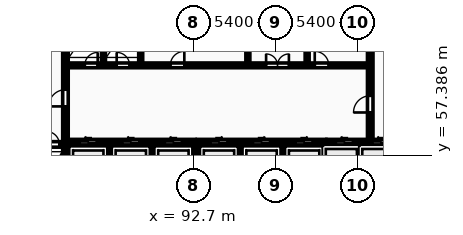
"""IFC4 building model, lengths in metres.
Left out: names, types, materials, properties, quantities, classifications, styles, units other than length and angle.
Written with IfcOpenShell. Run it as: python <this file> out.ifc"""

import sys

from ifc_helpers import new_model, si_unit, direction, frame, frame_2d, origin, place, context, subcontext, project, spatial, rectangle, extrude, element, fill, save


model = new_model("IFC4")
c1 = context("Model", 3, precision=1e-05, world=origin(), true_north=direction((0.0, 1.0)))
c2 = subcontext(c1, "Body", "Model", "MODEL_VIEW")
j1 = project(units=[si_unit("LENGTHUNIT", "METRE"), si_unit("PLANEANGLEUNIT", "RADIAN")], contexts=[c1])
p1 = place(None, origin())
s1 = spatial("IfcSite", under=j1, at=p1, CompositionType="ELEMENT")
p2 = place(p1, origin())
s2 = spatial("IfcBuilding", under=s1, at=p2, CompositionType="ELEMENT")
p3 = place(p2, origin())
s3 = spatial("IfcBuildingStorey", under=s2, at=p3, CompositionType="ELEMENT", Elevation=0.0)
p4 = place(p3, frame((79.79, 58.1, 0.0), z_axis=(0.0, 0.0, 1.0), x_axis=(1.0, 0.0, 0.0)))
e1 = element("IfcWall", 1, at=p4, inside=s3, PredefinedType="SHEAR", context=c2, shape_type="SweptSolid", body=[
    extrude(rectangle(XDim=4.39, YDim=0.25, at=frame_2d((2.195, 0.0))), origin(), (0.0, 0.0, 1.0), 5.4),
])
p5 = place(p4, frame((1.05, 0.0, 0.0)))
e2 = element("IfcOpeningElement", 2, at=p5, cuts=e1, PredefinedType="OPENING", context=c2, shape_type="SweptSolid", body=[
    extrude(rectangle(XDim=1.12, YDim=2.12, at=frame_2d((0.56, 1.06))), frame((0.0, 0.135, 0.0), z_axis=(0.0, -1.0, 0.0), x_axis=(1.0, 0.0, 0.0)), (0.0, 0.0, 1.0), 0.27),
])
p6 = place(p4, frame((3.26, 0.0, 0.0)))
e3 = element("IfcOpeningElement", 3, at=p6, cuts=e1, PredefinedType="OPENING", context=c2, shape_type="SweptSolid", body=[
    extrude(rectangle(XDim=0.85, YDim=2.05, at=frame_2d((0.425, 1.025))), frame((0.0, 0.135, 0.0), z_axis=(0.0, -1.0, 0.0), x_axis=(1.0, 0.0, 0.0)), (0.0, 0.0, 1.0), 0.27),
])
p7 = place(p3, frame((84.3, 55.4, 0.0), z_axis=(0.0, 0.0, 1.0), x_axis=(0.0, 1.0, 0.0)))
e4 = element("IfcWall", 4, at=p7, inside=s3, PredefinedType="SHEAR", context=c2, shape_type="SweptSolid", body=[
    extrude(rectangle(XDim=11.6, YDim=0.25, at=frame_2d((5.8, 0.0))), origin(), (0.0, 0.0, 1.0), 5.4),
])
p8 = place(p7, frame((5.2, 0.0, 0.0)))
e5 = element("IfcOpeningElement", 5, at=p8, cuts=e4, PredefinedType="OPENING", context=c2, shape_type="SweptSolid", body=[
    extrude(rectangle(XDim=1.1, YDim=2.1, at=frame_2d((0.55, 1.05))), frame((0.0, 0.135, 0.0), z_axis=(0.0, -1.0, 0.0), x_axis=(1.0, 0.0, 0.0)), (0.0, 0.0, 1.0), 0.27),
])
for number, where, z_axis, x_axis in (
    (6, (87.2, 55.4, 0.0), (0.0, 0.0, 1.0), (0.0, 1.0, 0.0)),
    (7, (90.0, 55.4, 0.0), (0.0, 0.0, 1.0), (0.0, 1.0, 0.0)),
):
    element("IfcWall", number, at=place(p3, frame(where, z_axis=z_axis, x_axis=x_axis)), inside=s3, PredefinedType="PARTITIONING", context=c2, shape_type="SweptSolid", body=[
        extrude(rectangle(XDim=2.72, YDim=0.2, at=frame_2d((1.36, 0.0))), origin(), (0.0, 0.0, 1.0), 5.1),
    ])
p9 = place(p3, frame((84.42, 58.25, 0.0), z_axis=(0.0, 0.0, 1.0), x_axis=(1.0, 0.0, 0.0)))
e8 = element("IfcWall", 8, at=p9, inside=s3, PredefinedType="SHEAR", context=c2, shape_type="SweptSolid", body=[
    extrude(rectangle(XDim=8.36, YDim=0.25, at=frame_2d((4.18, 0.0))), origin(), (0.0, 0.0, 1.0), 5.4),
])
p10 = place(p9, frame((0.82, 0.0, 0.0)))
e9 = element("IfcOpeningElement", 9, at=p10, cuts=e8, PredefinedType="OPENING", context=c2, shape_type="SweptSolid", body=[
    extrude(rectangle(XDim=1.12, YDim=2.12, at=frame_2d((0.56, 1.06))), frame((0.0, 0.135, 0.0), z_axis=(0.0, -1.0, 0.0), x_axis=(1.0, 0.0, 0.0)), (0.0, 0.0, 1.0), 0.27),
])
p11 = place(p9, frame((3.62, 0.0, 0.0)))
e10 = element("IfcOpeningElement", 10, at=p11, cuts=e8, PredefinedType="OPENING", context=c2, shape_type="SweptSolid", body=[
    extrude(rectangle(XDim=1.12, YDim=2.12, at=frame_2d((0.56, 1.06))), frame((0.0, 0.135, 0.0), z_axis=(0.0, -1.0, 0.0), x_axis=(1.0, 0.0, 0.0)), (0.0, 0.0, 1.0), 0.27),
])
p12 = place(p9, frame((6.42, 0.0, 0.0)))
e11 = element("IfcOpeningElement", 11, at=p12, cuts=e8, PredefinedType="OPENING", context=c2, shape_type="SweptSolid", body=[
    extrude(rectangle(XDim=1.12, YDim=2.12, at=frame_2d((0.56, 1.06))), frame((0.0, 0.135, 0.0), z_axis=(0.0, -1.0, 0.0), x_axis=(1.0, 0.0, 0.0)), (0.0, 0.0, 1.0), 0.27),
])
p13 = place(p3, frame((92.9, 55.4, 0.0), z_axis=(0.0, 0.0, 1.0), x_axis=(0.0, 1.0, 0.0)))
e12 = element("IfcWall", 12, at=p13, inside=s3, PredefinedType="SHEAR", context=c2, shape_type="SweptSolid", body=[
    extrude(rectangle(XDim=2.85, YDim=0.25, at=frame_2d((1.425, 0.0))), origin(), (0.0, 0.0, 1.0), 5.4),
])
for number, where, z_axis, x_axis in (
    (13, (95.8, 55.4, 0.0), (0.0, 0.0, 1.0), (0.0, 1.0, 0.0)),
    (14, (98.6, 55.4, 0.0), (0.0, 0.0, 1.0), (0.0, 1.0, 0.0)),
):
    element("IfcWall", number, at=place(p3, frame(where, z_axis=z_axis, x_axis=x_axis)), inside=s3, PredefinedType="PARTITIONING", context=c2, shape_type="SweptSolid", body=[
        extrude(rectangle(XDim=2.72, YDim=0.2, at=frame_2d((1.36, 0.0))), origin(), (0.0, 0.0, 1.0), 5.1),
    ])
p14 = place(p3, frame((93.02, 58.25, 0.0), z_axis=(0.0, 0.0, 1.0), x_axis=(1.0, 0.0, 0.0)))
e15 = element("IfcWall", 15, at=p14, inside=s3, PredefinedType="SHEAR", context=c2, shape_type="SweptSolid", body=[
    extrude(rectangle(XDim=8.36, YDim=0.25, at=frame_2d((4.18, 0.0))), origin(), (0.0, 0.0, 1.0), 5.4),
])
p15 = place(p14, frame((0.82, 0.0, 0.0)))
e16 = element("IfcOpeningElement", 16, at=p15, cuts=e15, PredefinedType="OPENING", context=c2, shape_type="SweptSolid", body=[
    extrude(rectangle(XDim=1.12, YDim=2.12, at=frame_2d((0.56, 1.06))), frame((0.0, 0.135, 0.0), z_axis=(0.0, -1.0, 0.0), x_axis=(1.0, 0.0, 0.0)), (0.0, 0.0, 1.0), 0.27),
])
p16 = place(p14, frame((3.62, 0.0, 0.0)))
e17 = element("IfcOpeningElement", 17, at=p16, cuts=e15, PredefinedType="OPENING", context=c2, shape_type="SweptSolid", body=[
    extrude(rectangle(XDim=1.12, YDim=2.12, at=frame_2d((0.56, 1.06))), frame((0.0, 0.135, 0.0), z_axis=(0.0, -1.0, 0.0), x_axis=(1.0, 0.0, 0.0)), (0.0, 0.0, 1.0), 0.27),
])
p17 = place(p14, frame((6.42, 0.0, 0.0)))
e18 = element("IfcOpeningElement", 18, at=p17, cuts=e15, PredefinedType="OPENING", context=c2, shape_type="SweptSolid", body=[
    extrude(rectangle(XDim=1.12, YDim=2.12, at=frame_2d((0.56, 1.06))), frame((0.0, 0.135, 0.0), z_axis=(0.0, -1.0, 0.0), x_axis=(1.0, 0.0, 0.0)), (0.0, 0.0, 1.0), 0.27),
])
p18 = place(p3, frame((101.48, 55.4, 0.0), z_axis=(0.0, 0.0, 1.0), x_axis=(0.0, 1.0, 0.0)))
e19 = element("IfcWall", 19, at=p18, inside=s3, PredefinedType="SHEAR", context=c2, shape_type="SweptSolid", body=[
    extrude(rectangle(XDim=2.85, YDim=0.25, at=frame_2d((1.425, 0.0))), origin(), (0.0, 0.0, 1.0), 5.4),
])
p19 = place(p3, frame((103.85, 55.4, 0.0), z_axis=(0.0, 0.0, 1.0), x_axis=(0.0, 1.0, 0.0)))
e20 = element("IfcWall", 20, at=p19, inside=s3, PredefinedType="PARTITIONING", context=c2, shape_type="SweptSolid", body=[
    extrude(rectangle(XDim=2.72, YDim=0.2, at=frame_2d((1.36, 0.0))), origin(), (0.0, 0.0, 1.0), 5.1),
])
p20 = place(p3, frame((101.55, 58.25, 0.0), z_axis=(0.0, 0.0, 1.0), x_axis=(1.0, 0.0, 0.0)))
e21 = element("IfcWall", 21, at=p20, inside=s3, PredefinedType="SHEAR", context=c2, shape_type="SweptSolid", body=[
    extrude(rectangle(XDim=4.6, YDim=0.25, at=frame_2d((2.3, 0.0))), origin(), (0.0, 0.0, 1.0), 5.4),
])
p21 = place(p20, frame((0.54, 0.0, 0.0)))
e22 = element("IfcOpeningElement", 22, at=p21, cuts=e21, PredefinedType="OPENING", context=c2, shape_type="SweptSolid", body=[
    extrude(rectangle(XDim=1.12, YDim=2.12, at=frame_2d((0.56, 1.06))), frame((0.0, 0.135, 0.0), z_axis=(0.0, -1.0, 0.0), x_axis=(1.0, 0.0, 0.0)), (0.0, 0.0, 1.0), 0.27),
])
p22 = place(p20, frame((2.94, 0.0, 0.0)))
e23 = element("IfcOpeningElement", 23, at=p22, cuts=e21, PredefinedType="OPENING", context=c2, shape_type="SweptSolid", body=[
    extrude(rectangle(XDim=1.12, YDim=2.12, at=frame_2d((0.56, 1.06))), frame((0.0, 0.135, 0.0), z_axis=(0.0, -1.0, 0.0), x_axis=(1.0, 0.0, 0.0)), (0.0, 0.0, 1.0), 0.27),
])
for number, where, z_axis, x_axis in (
    (24, (86.8, 63.4, 0.0), (0.0, 0.0, 1.0), (0.0, 1.0, 0.0)),
    (25, (89.25, 63.4, 0.0), (0.0, 0.0, 1.0), (0.0, 1.0, 0.0)),
    (26, (96.3, 63.4, 0.0), (0.0, 0.0, 1.0), (0.0, 1.0, 0.0)),
    (27, (100.2, 63.4, 0.0), (0.0, 0.0, 1.0), (0.0, 1.0, 0.0)),
):
    element("IfcWall", number, at=place(p3, frame(where, z_axis=z_axis, x_axis=x_axis)), inside=s3, PredefinedType="PARTITIONING", context=c2, shape_type="SweptSolid", body=[
        extrude(rectangle(XDim=3.6, YDim=0.15, at=frame_2d((1.8, 0.0))), origin(), (0.0, 0.0, 1.0), 5.1),
    ])
p23 = place(p3, frame((84.42, 63.3, 0.0), z_axis=(0.0, 0.0, 1.0), x_axis=(1.0, 0.0, 0.0)))
e28 = element("IfcWall", 28, at=p23, inside=s3, PredefinedType="PARTITIONING", context=c2, shape_type="SweptSolid", body=[
    extrude(rectangle(XDim=19.83, YDim=0.2, at=frame_2d((9.915, 0.0))), origin(), (0.0, 0.0, 1.0), 5.1),
])
p24 = place(p23, frame((1.15, 0.0, 0.0)))
e29 = element("IfcOpeningElement", 29, at=p24, cuts=e28, PredefinedType="OPENING", context=c2, shape_type="SweptSolid", body=[
    extrude(rectangle(XDim=0.85, YDim=2.05, at=frame_2d((0.425, 1.025))), frame((0.0, 0.11, 0.0), z_axis=(0.0, -1.0, 0.0), x_axis=(1.0, 0.0, 0.0)), (0.0, 0.0, 1.0), 0.22),
])
p25 = place(p23, frame((3.25, 0.0, 0.0)))
e30 = element("IfcOpeningElement", 30, at=p25, cuts=e28, PredefinedType="OPENING", context=c2, shape_type="SweptSolid", body=[
    extrude(rectangle(XDim=0.85, YDim=2.05, at=frame_2d((0.425, 1.025))), frame((0.0, 0.11, 0.0), z_axis=(0.0, -1.0, 0.0), x_axis=(1.0, 0.0, 0.0)), (0.0, 0.0, 1.0), 0.22),
])
p26 = place(p23, frame((13.08, 0.0, 0.0)))
e31 = element("IfcOpeningElement", 31, at=p26, cuts=e28, PredefinedType="OPENING", context=c2, shape_type="SweptSolid", body=[
    extrude(rectangle(XDim=1.5, YDim=2.2, at=frame_2d((0.75, 1.1))), frame((0.0, 0.11, 0.0), z_axis=(0.0, -1.0, 0.0), x_axis=(1.0, 0.0, 0.0)), (0.0, 0.0, 1.0), 0.22),
])
p27 = place(p23, frame((6.78, 0.0, 0.0)))
e32 = element("IfcOpeningElement", 32, at=p27, cuts=e28, PredefinedType="OPENING", context=c2, shape_type="SweptSolid", body=[
    extrude(rectangle(XDim=0.92, YDim=2.08, at=frame_2d((0.46, 1.04))), frame((0.0, 0.11, 0.0), z_axis=(0.0, -1.0, 0.0), x_axis=(1.0, 0.0, 0.0)), (0.0, 0.0, 1.0), 0.22),
])
p28 = place(p23, frame((16.28, 0.0, 0.0)))
e33 = element("IfcOpeningElement", 33, at=p28, cuts=e28, PredefinedType="OPENING", context=c2, shape_type="SweptSolid", body=[
    extrude(rectangle(XDim=0.92, YDim=2.08, at=frame_2d((0.46, 1.04))), frame((0.0, 0.11, 0.0), z_axis=(0.0, -1.0, 0.0), x_axis=(1.0, 0.0, 0.0)), (0.0, 0.0, 1.0), 0.22),
])
p29 = place(p3, frame((104.35, 58.4, 0.0), z_axis=(0.0, 0.0, 1.0), x_axis=(0.0, 1.0, 0.0)))
e34 = element("IfcWall", 34, at=p29, inside=s3, PredefinedType="SHEAR", context=c2, shape_type="SweptSolid", body=[
    extrude(rectangle(XDim=8.6, YDim=0.25, at=frame_2d((4.3, 0.0))), origin(), (0.0, 0.0, 1.0), 5.4),
])
p30 = place(p29, frame((1.8, 0.0, 0.0)))
e35 = element("IfcOpeningElement", 35, at=p30, cuts=e34, PredefinedType="OPENING", context=c2, shape_type="SweptSolid", body=[
    extrude(rectangle(XDim=1.1, YDim=2.1, at=frame_2d((0.55, 1.05))), frame((0.0, 0.135, 0.0), z_axis=(0.0, -1.0, 0.0), x_axis=(1.0, 0.0, 0.0)), (0.0, 0.0, 1.0), 0.27),
])
p31 = place(p6, origin())
e36 = element("IfcDoor", 36, at=p31, inside=s3, OperationType="SINGLE_SWING_LEFT", PredefinedType="DOOR", context=c2, shape_type="SweptSolid", body=[
    extrude(rectangle(XDim=0.85, YDim=2.05, at=frame_2d((0.425, 1.025))), frame((0.0, 0.025, 0.0), z_axis=(0.0, -1.0, 0.0), x_axis=(1.0, 0.0, 0.0)), (0.0, 0.0, 1.0), 0.05),
])
fill(e3, e36)
p32 = place(p8, origin())
e37 = element("IfcDoor", 37, at=p32, inside=s3, OperationType="SINGLE_SWING_LEFT", PredefinedType="DOOR", context=c2, shape_type="SweptSolid", body=[
    extrude(rectangle(XDim=1.1, YDim=2.1, at=frame_2d((0.55, 1.05))), frame((0.0, 0.025, 0.0), z_axis=(0.0, -1.0, 0.0), x_axis=(1.0, 0.0, 0.0)), (0.0, 0.0, 1.0), 0.05),
])
fill(e5, e37)
p33 = place(p10, origin())
e38 = element("IfcDoor", 38, at=p33, inside=s3, OperationType="SLIDING_TO_LEFT", PredefinedType="DOOR", context=c2, shape_type="SweptSolid", body=[
    extrude(rectangle(XDim=1.12, YDim=2.12, at=frame_2d((0.56, 1.06))), frame((0.0, 0.025, 0.0), z_axis=(0.0, -1.0, 0.0), x_axis=(1.0, 0.0, 0.0)), (0.0, 0.0, 1.0), 0.05),
])
fill(e9, e38)
p34 = place(p11, origin())
e39 = element("IfcDoor", 39, at=p34, inside=s3, OperationType="SLIDING_TO_LEFT", PredefinedType="DOOR", context=c2, shape_type="SweptSolid", body=[
    extrude(rectangle(XDim=1.12, YDim=2.12, at=frame_2d((0.56, 1.06))), frame((0.0, 0.025, 0.0), z_axis=(0.0, -1.0, 0.0), x_axis=(1.0, 0.0, 0.0)), (0.0, 0.0, 1.0), 0.05),
])
fill(e10, e39)
p35 = place(p12, origin())
e40 = element("IfcDoor", 40, at=p35, inside=s3, OperationType="SLIDING_TO_LEFT", PredefinedType="DOOR", context=c2, shape_type="SweptSolid", body=[
    extrude(rectangle(XDim=1.12, YDim=2.12, at=frame_2d((0.56, 1.06))), frame((0.0, 0.025, 0.0), z_axis=(0.0, -1.0, 0.0), x_axis=(1.0, 0.0, 0.0)), (0.0, 0.0, 1.0), 0.05),
])
fill(e11, e40)
p36 = place(p15, origin())
e41 = element("IfcDoor", 41, at=p36, inside=s3, OperationType="SLIDING_TO_RIGHT", PredefinedType="DOOR", context=c2, shape_type="SweptSolid", body=[
    extrude(rectangle(XDim=1.12, YDim=2.12, at=frame_2d((0.56, 1.06))), frame((0.0, 0.025, 0.0), z_axis=(0.0, -1.0, 0.0), x_axis=(1.0, 0.0, 0.0)), (0.0, 0.0, 1.0), 0.05),
])
fill(e16, e41)
p37 = place(p16, origin())
e42 = element("IfcDoor", 42, at=p37, inside=s3, OperationType="SLIDING_TO_RIGHT", PredefinedType="DOOR", context=c2, shape_type="SweptSolid", body=[
    extrude(rectangle(XDim=1.12, YDim=2.12, at=frame_2d((0.56, 1.06))), frame((0.0, 0.025, 0.0), z_axis=(0.0, -1.0, 0.0), x_axis=(1.0, 0.0, 0.0)), (0.0, 0.0, 1.0), 0.05),
])
fill(e17, e42)
p38 = place(p17, origin())
e43 = element("IfcDoor", 43, at=p38, inside=s3, OperationType="SLIDING_TO_RIGHT", PredefinedType="DOOR", context=c2, shape_type="SweptSolid", body=[
    extrude(rectangle(XDim=1.12, YDim=2.12, at=frame_2d((0.56, 1.06))), frame((0.0, 0.025, 0.0), z_axis=(0.0, -1.0, 0.0), x_axis=(1.0, 0.0, 0.0)), (0.0, 0.0, 1.0), 0.05),
])
fill(e18, e43)
p39 = place(p21, origin())
e44 = element("IfcDoor", 44, at=p39, inside=s3, OperationType="SLIDING_TO_LEFT", PredefinedType="DOOR", context=c2, shape_type="SweptSolid", body=[
    extrude(rectangle(XDim=1.12, YDim=2.12, at=frame_2d((0.56, 1.06))), frame((0.0, 0.025, 0.0), z_axis=(0.0, -1.0, 0.0), x_axis=(1.0, 0.0, 0.0)), (0.0, 0.0, 1.0), 0.05),
])
fill(e22, e44)
p40 = place(p22, origin())
e45 = element("IfcDoor", 45, at=p40, inside=s3, OperationType="SLIDING_TO_LEFT", PredefinedType="DOOR", context=c2, shape_type="SweptSolid", body=[
    extrude(rectangle(XDim=1.12, YDim=2.12, at=frame_2d((0.56, 1.06))), frame((0.0, 0.025, 0.0), z_axis=(0.0, -1.0, 0.0), x_axis=(1.0, 0.0, 0.0)), (0.0, 0.0, 1.0), 0.05),
])
fill(e23, e45)
p41 = place(p24, origin())
e46 = element("IfcDoor", 46, at=p41, inside=s3, OperationType="SINGLE_SWING_RIGHT", PredefinedType="DOOR", context=c2, shape_type="SweptSolid", body=[
    extrude(rectangle(XDim=0.85, YDim=2.05, at=frame_2d((0.425, 1.025))), frame((0.0, 0.025, 0.0), z_axis=(0.0, -1.0, 0.0), x_axis=(1.0, 0.0, 0.0)), (0.0, 0.0, 1.0), 0.05),
])
fill(e29, e46)
p42 = place(p25, origin())
e47 = element("IfcDoor", 47, at=p42, inside=s3, OperationType="SINGLE_SWING_LEFT", PredefinedType="DOOR", context=c2, shape_type="SweptSolid", body=[
    extrude(rectangle(XDim=0.85, YDim=2.05, at=frame_2d((0.425, 1.025))), frame((0.0, 0.025, 0.0), z_axis=(0.0, -1.0, 0.0), x_axis=(1.0, 0.0, 0.0)), (0.0, 0.0, 1.0), 0.05),
])
fill(e30, e47)
p43 = place(p26, origin())
e48 = element("IfcDoor", 48, at=p43, inside=s3, OperationType="DOUBLE_DOOR_SINGLE_SWING", PredefinedType="DOOR", context=c2, shape_type="SweptSolid", body=[
    extrude(rectangle(XDim=1.5, YDim=2.2, at=frame_2d((0.75, 1.1))), frame((0.0, 0.025, 0.0), z_axis=(0.0, -1.0, 0.0), x_axis=(1.0, 0.0, 0.0)), (0.0, 0.0, 1.0), 0.05),
])
fill(e31, e48)
p44 = place(p27, origin())
e49 = element("IfcDoor", 49, at=p44, inside=s3, OperationType="SINGLE_SWING_RIGHT", PredefinedType="DOOR", context=c2, shape_type="SweptSolid", body=[
    extrude(rectangle(XDim=0.92, YDim=2.08, at=frame_2d((0.46, 1.04))), frame((0.0, 0.025, 0.0), z_axis=(0.0, -1.0, 0.0), x_axis=(1.0, 0.0, 0.0)), (0.0, 0.0, 1.0), 0.05),
])
fill(e32, e49)
p45 = place(p28, origin())
e50 = element("IfcDoor", 50, at=p45, inside=s3, OperationType="SINGLE_SWING_LEFT", PredefinedType="DOOR", context=c2, shape_type="SweptSolid", body=[
    extrude(rectangle(XDim=0.92, YDim=2.08, at=frame_2d((0.46, 1.04))), frame((0.0, 0.025, 0.0), z_axis=(0.0, -1.0, 0.0), x_axis=(1.0, 0.0, 0.0)), (0.0, 0.0, 1.0), 0.05),
])
fill(e33, e50)
p46 = place(p30, origin())
e51 = element("IfcDoor", 51, at=p46, inside=s3, OperationType="SINGLE_SWING_LEFT", PredefinedType="DOOR", context=c2, shape_type="SweptSolid", body=[
    extrude(rectangle(XDim=1.1, YDim=2.1, at=frame_2d((0.55, 1.05))), frame((0.0, 0.025, 0.0), z_axis=(0.0, -1.0, 0.0), x_axis=(1.0, 0.0, 0.0)), (0.0, 0.0, 1.0), 0.05),
])
fill(e35, e51)
save(model, sys.argv[1])
